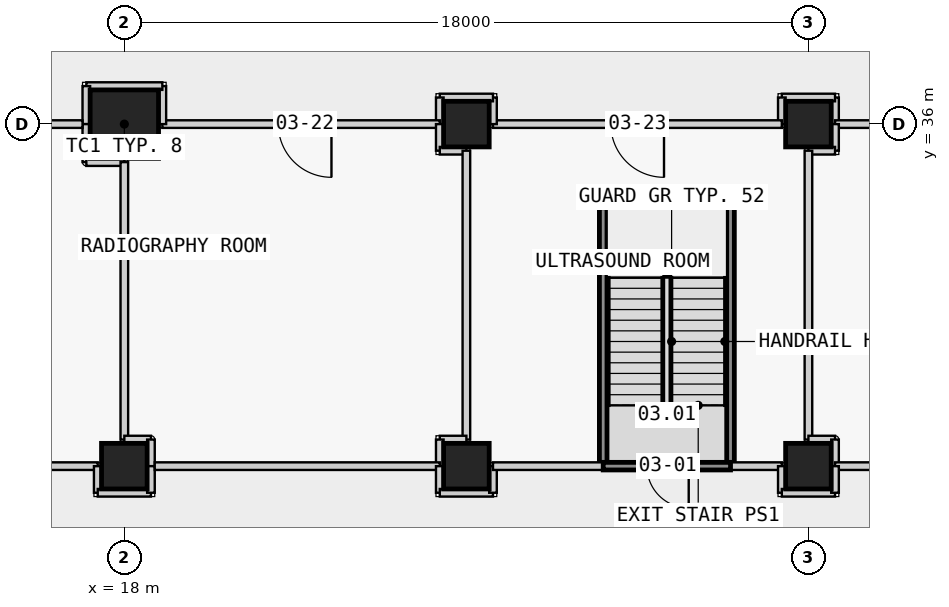
"""IFC4 building model, lengths in metres.
Left out: names, types, materials, properties, quantities, classifications, styles, units other than length and angle.
Written with IfcOpenShell. Run it as: python <this file> out.ifc"""

import sys

from ifc_helpers import new_model, si_unit, direction, frame, frame_2d, origin, origin_2d, place, context, subcontext, project, spatial, rectangle, extrude, element, fill, save


model = new_model("IFC4")
c1 = context("Model", 3, precision=1e-05, world=origin(), true_north=direction((0.0, 1.0)))
c2 = subcontext(c1, "Body", "Model", "MODEL_VIEW")
j1 = project(units=[si_unit("LENGTHUNIT", "METRE"), si_unit("PLANEANGLEUNIT", "RADIAN")], contexts=[c1])
p1 = place(None, origin())
s1 = spatial("IfcSite", under=j1, at=p1, CompositionType="ELEMENT")
p2 = place(p1, origin())
s2 = spatial("IfcBuilding", under=s1, at=p2, CompositionType="ELEMENT")
p3 = place(p2, frame((0.0, 0.0, 17.3)))
s3 = spatial("IfcBuildingStorey", under=s2, at=p3, CompositionType="ELEMENT", Elevation=17.3)
p4 = place(p3, frame((18.0, 27.0, 0.0), z_axis=(0.0, 0.0, 1.0), x_axis=(1.0, 0.0, 0.0)))
e1 = element("IfcColumn", 1, at=p4, inside=s3, PredefinedType="COLUMN", context=c2, shape_type="SweptSolid", body=[
    extrude(rectangle(XDim=1.2, YDim=1.2, at=origin_2d()), origin(), (0.0, 0.0, 1.0), 4.5),
])
p5 = place(p3, frame((18.0, 36.0, 0.0), z_axis=(0.0, 0.0, 1.0), x_axis=(1.0, 0.0, 0.0)))
e2 = element("IfcColumn", 2, at=p5, inside=s3, PredefinedType="COLUMN", context=c2, shape_type="SweptSolid", body=[
    extrude(rectangle(XDim=1.8, YDim=1.8, at=origin_2d()), origin(), (0.0, 0.0, 1.0), 4.5),
])
for number, where, z_axis, x_axis in (
    (3, (27.0, 27.0, 0.0), (0.0, 0.0, 1.0), (1.0, 0.0, 0.0)),
    (4, (27.0, 36.0, 0.0), (0.0, 0.0, 1.0), (1.0, 0.0, 0.0)),
    (5, (36.0, 27.0, 0.0), (0.0, 0.0, 1.0), (1.0, 0.0, 0.0)),
    (6, (36.0, 36.0, 0.0), (0.0, 0.0, 1.0), (1.0, 0.0, 0.0)),
):
    element("IfcColumn", number, at=place(p3, frame(where, z_axis=z_axis, x_axis=x_axis)), inside=s3, PredefinedType="COLUMN", context=c2, shape_type="SweptSolid", body=[
        extrude(rectangle(XDim=1.2, YDim=1.2, at=origin_2d()), origin(), (0.0, 0.0, 1.0), 4.5),
    ])
p6 = place(p3, frame((30.6, 27.0, 0.0), z_axis=(0.0, 0.0, 1.0), x_axis=(0.0, 1.0, 0.0)))
e7 = element("IfcWall", 7, at=p6, inside=s3, PredefinedType="PARTITIONING", context=c2, shape_type="SweptSolid", body=[
    extrude(rectangle(XDim=6.9, YDim=0.2, at=frame_2d((3.45, 0.0))), origin(), (0.0, 0.0, 1.0), 4.15),
])
p7 = place(p3, frame((30.6, 33.9, 0.0), z_axis=(0.0, 0.0, 1.0), x_axis=(1.0, 0.0, 0.0)))
e8 = element("IfcWall", 8, at=p7, inside=s3, PredefinedType="PARTITIONING", context=c2, shape_type="SweptSolid", body=[
    extrude(rectangle(XDim=3.35, YDim=0.2, at=frame_2d((1.675, 0.0))), origin(), (0.0, 0.0, 1.0), 4.15),
])
p8 = place(p3, frame((33.95, 33.9, 0.0), z_axis=(0.0, 0.0, 1.0), x_axis=(0.0, -1.0, 0.0)))
e9 = element("IfcWall", 9, at=p8, inside=s3, PredefinedType="PARTITIONING", context=c2, shape_type="SweptSolid", body=[
    extrude(rectangle(XDim=6.9, YDim=0.2, at=frame_2d((3.45, 0.0))), origin(), (0.0, 0.0, 1.0), 4.15),
])
p9 = place(p3, frame((36.7, 36.0, 0.0), z_axis=(0.0, 0.0, 1.0), x_axis=(0.0, 1.0, 0.0)))
e10 = element("IfcWall", 10, at=p9, inside=s3, PredefinedType="PARTITIONING", context=c2, shape_type="SweptSolid", body=[
    extrude(rectangle(XDim=0.7, YDim=0.2, at=frame_2d((0.35, 0.0))), origin(), (0.0, 0.0, 1.0), 4.15),
])
p10 = place(p3, frame((36.7, 36.7, 0.0), z_axis=(0.0, 0.0, 1.0), x_axis=(-1.0, 0.0, 0.0)))
e11 = element("IfcWall", 11, at=p10, inside=s3, PredefinedType="PARTITIONING", context=c2, shape_type="SweptSolid", body=[
    extrude(rectangle(XDim=1.4, YDim=0.2, at=frame_2d((0.7, 0.0))), origin(), (0.0, 0.0, 1.0), 4.15),
])
p11 = place(p3, frame((35.3, 36.7, 0.0), z_axis=(0.0, 0.0, 1.0), x_axis=(0.0, -1.0, 0.0)))
e12 = element("IfcWall", 12, at=p11, inside=s3, PredefinedType="PARTITIONING", context=c2, shape_type="SweptSolid", body=[
    extrude(rectangle(XDim=0.7, YDim=0.2, at=frame_2d((0.35, 0.0))), origin(), (0.0, 0.0, 1.0), 4.15),
])
p12 = place(p3, frame((35.3, 36.0, 0.0), z_axis=(0.0, 0.0, 1.0), x_axis=(-1.0, 0.0, 0.0)))
e13 = element("IfcWall", 13, at=p12, inside=s3, PredefinedType="PARTITIONING", context=c2, shape_type="SweptSolid", body=[
    extrude(rectangle(XDim=7.6, YDim=0.2, at=frame_2d((3.8, 0.0))), origin(), (0.0, 0.0, 1.0), 4.15),
])
p13 = place(p12, frame((3.1, 0.0, 0.0)))
e14 = element("IfcOpeningElement", 14, at=p13, cuts=e13, PredefinedType="OPENING", context=c2, shape_type="SweptSolid", body=[
    extrude(rectangle(XDim=1.4, YDim=2.1, at=frame_2d((0.7, 1.05))), frame((0.0, 0.11, 0.0), z_axis=(0.0, -1.0, 0.0), x_axis=(1.0, 0.0, 0.0)), (0.0, 0.0, 1.0), 0.22),
])
p14 = place(p3, frame((27.7, 36.0, 0.0), z_axis=(0.0, 0.0, 1.0), x_axis=(0.0, 1.0, 0.0)))
e15 = element("IfcWall", 15, at=p14, inside=s3, PredefinedType="PARTITIONING", context=c2, shape_type="SweptSolid", body=[
    extrude(rectangle(XDim=0.7, YDim=0.2, at=frame_2d((0.35, 0.0))), origin(), (0.0, 0.0, 1.0), 4.15),
])
p15 = place(p3, frame((27.7, 36.7, 0.0), z_axis=(0.0, 0.0, 1.0), x_axis=(-1.0, 0.0, 0.0)))
e16 = element("IfcWall", 16, at=p15, inside=s3, PredefinedType="PARTITIONING", context=c2, shape_type="SweptSolid", body=[
    extrude(rectangle(XDim=1.4, YDim=0.2, at=frame_2d((0.7, 0.0))), origin(), (0.0, 0.0, 1.0), 4.15),
])
p16 = place(p3, frame((26.3, 36.7, 0.0), z_axis=(0.0, 0.0, 1.0), x_axis=(0.0, -1.0, 0.0)))
e17 = element("IfcWall", 17, at=p16, inside=s3, PredefinedType="PARTITIONING", context=c2, shape_type="SweptSolid", body=[
    extrude(rectangle(XDim=0.7, YDim=0.2, at=frame_2d((0.35, 0.0))), origin(), (0.0, 0.0, 1.0), 4.15),
])
p17 = place(p3, frame((26.3, 36.0, 0.0), z_axis=(0.0, 0.0, 1.0), x_axis=(-1.0, 0.0, 0.0)))
e18 = element("IfcWall", 18, at=p17, inside=s3, PredefinedType="PARTITIONING", context=c2, shape_type="SweptSolid", body=[
    extrude(rectangle(XDim=7.3, YDim=0.2, at=frame_2d((3.65, 0.0))), origin(), (0.0, 0.0, 1.0), 4.15),
])
p18 = place(p17, frame((2.85, 0.0, 0.0)))
e19 = element("IfcOpeningElement", 19, at=p18, cuts=e18, PredefinedType="OPENING", context=c2, shape_type="SweptSolid", body=[
    extrude(rectangle(XDim=1.4, YDim=2.1, at=frame_2d((0.7, 1.05))), frame((0.0, 0.11, 0.0), z_axis=(0.0, -1.0, 0.0), x_axis=(1.0, 0.0, 0.0)), (0.0, 0.0, 1.0), 0.22),
])
p19 = place(p3, frame((19.0, 36.0, 0.0), z_axis=(0.0, 0.0, 1.0), x_axis=(0.0, 1.0, 0.0)))
e20 = element("IfcWall", 20, at=p19, inside=s3, PredefinedType="PARTITIONING", context=c2, shape_type="SweptSolid", body=[
    extrude(rectangle(XDim=1.0, YDim=0.2, at=frame_2d((0.5, 0.0))), origin(), (0.0, 0.0, 1.0), 4.15),
])
p20 = place(p3, frame((19.0, 37.0, 0.0), z_axis=(0.0, 0.0, 1.0), x_axis=(-1.0, 0.0, 0.0)))
e21 = element("IfcWall", 21, at=p20, inside=s3, PredefinedType="PARTITIONING", context=c2, shape_type="SweptSolid", body=[
    extrude(rectangle(XDim=2.0, YDim=0.2, at=frame_2d((1.0, 0.0))), origin(), (0.0, 0.0, 1.0), 4.15),
])
for number, where, z_axis, x_axis in (
    (22, (17.0, 37.0, 0.0), (0.0, 0.0, 1.0), (0.0, -1.0, 0.0)),
    (23, (17.0, 36.0, 0.0), (0.0, 0.0, 1.0), (0.0, -1.0, 0.0)),
    (24, (17.0, 35.0, 0.0), (0.0, 0.0, 1.0), (1.0, 0.0, 0.0)),
):
    element("IfcWall", number, at=place(p3, frame(where, z_axis=z_axis, x_axis=x_axis)), inside=s3, PredefinedType="PARTITIONING", context=c2, shape_type="SweptSolid", body=[
        extrude(rectangle(XDim=1.0, YDim=0.2, at=frame_2d((0.5, 0.0))), origin(), (0.0, 0.0, 1.0), 4.15),
    ])
p21 = place(p3, frame((18.0, 35.0, 0.0), z_axis=(0.0, 0.0, 1.0), x_axis=(0.0, -1.0, 0.0)))
e25 = element("IfcWall", 25, at=p21, inside=s3, PredefinedType="PARTITIONING", context=c2, shape_type="SweptSolid", body=[
    extrude(rectangle(XDim=7.3, YDim=0.2, at=frame_2d((3.65, 0.0))), origin(), (0.0, 0.0, 1.0), 4.15),
])
for number, where, z_axis, x_axis in (
    (26, (18.0, 27.7, 0.0), (0.0, 0.0, 1.0), (1.0, 0.0, 0.0)),
    (27, (18.7, 27.7, 0.0), (0.0, 0.0, 1.0), (0.0, -1.0, 0.0)),
):
    element("IfcWall", number, at=place(p3, frame(where, z_axis=z_axis, x_axis=x_axis)), inside=s3, PredefinedType="PARTITIONING", context=c2, shape_type="SweptSolid", body=[
        extrude(rectangle(XDim=0.7, YDim=0.2, at=frame_2d((0.35, 0.0))), origin(), (0.0, 0.0, 1.0), 4.15),
    ])
p22 = place(p3, frame((44.3, 36.0, 0.0), z_axis=(0.0, 0.0, 1.0), x_axis=(-1.0, 0.0, 0.0)))
e28 = element("IfcWall", 28, at=p22, inside=s3, PredefinedType="PARTITIONING", context=c2, shape_type="SweptSolid", body=[
    extrude(rectangle(XDim=7.6, YDim=0.2, at=frame_2d((3.8, 0.0))), origin(), (0.0, 0.0, 1.0), 4.15),
])
p23 = place(p22, frame((3.1, 0.0, 0.0)))
e29 = element("IfcOpeningElement", 29, at=p23, cuts=e28, PredefinedType="OPENING", context=c2, shape_type="SweptSolid", body=[
    extrude(rectangle(XDim=1.4, YDim=2.1, at=frame_2d((0.7, 1.05))), frame((0.0, 0.11, 0.0), z_axis=(0.0, -1.0, 0.0), x_axis=(1.0, 0.0, 0.0)), (0.0, 0.0, 1.0), 0.22),
])
for number, where, z_axis, x_axis in (
    (30, (26.3, 36.0, 0.0), (0.0, 0.0, 1.0), (0.0, -1.0, 0.0)),
    (31, (26.3, 35.3, 0.0), (0.0, 0.0, 1.0), (1.0, 0.0, 0.0)),
):
    element("IfcWall", number, at=place(p3, frame(where, z_axis=z_axis, x_axis=x_axis)), inside=s3, PredefinedType="PARTITIONING", context=c2, shape_type="SweptSolid", body=[
        extrude(rectangle(XDim=0.7, YDim=0.2, at=frame_2d((0.35, 0.0))), origin(), (0.0, 0.0, 1.0), 4.15),
    ])
p24 = place(p3, frame((27.0, 35.3, 0.0), z_axis=(0.0, 0.0, 1.0), x_axis=(0.0, -1.0, 0.0)))
e32 = element("IfcWall", 32, at=p24, inside=s3, PredefinedType="PARTITIONING", context=c2, shape_type="SweptSolid", body=[
    extrude(rectangle(XDim=7.6, YDim=0.2, at=frame_2d((3.8, 0.0))), origin(), (0.0, 0.0, 1.0), 4.15),
])
for number, where, z_axis, x_axis in (
    (33, (27.0, 27.7, 0.0), (0.0, 0.0, 1.0), (-1.0, 0.0, 0.0)),
    (34, (26.3, 27.7, 0.0), (0.0, 0.0, 1.0), (0.0, -1.0, 0.0)),
):
    element("IfcWall", number, at=place(p3, frame(where, z_axis=z_axis, x_axis=x_axis)), inside=s3, PredefinedType="PARTITIONING", context=c2, shape_type="SweptSolid", body=[
        extrude(rectangle(XDim=0.7, YDim=0.2, at=frame_2d((0.35, 0.0))), origin(), (0.0, 0.0, 1.0), 4.15),
    ])
p25 = place(p3, frame((9.7, 27.0, 0.0), z_axis=(0.0, 0.0, 1.0), x_axis=(1.0, 0.0, 0.0)))
e35 = element("IfcWall", 35, at=p25, inside=s3, PredefinedType="PARTITIONING", context=c2, shape_type="SweptSolid", body=[
    extrude(rectangle(XDim=7.6, YDim=0.2, at=frame_2d((3.8, 0.0))), origin(), (0.0, 0.0, 1.0), 4.15),
])
p26 = place(p25, frame((3.1, 0.0, 0.0)))
e36 = element("IfcOpeningElement", 36, at=p26, cuts=e35, PredefinedType="OPENING", context=c2, shape_type="SweptSolid", body=[
    extrude(rectangle(XDim=1.4, YDim=2.1, at=frame_2d((0.7, 1.05))), frame((0.0, 0.11, 0.0), z_axis=(0.0, -1.0, 0.0), x_axis=(1.0, 0.0, 0.0)), (0.0, 0.0, 1.0), 0.22),
])
p27 = place(p3, frame((17.3, 27.0, 0.0), z_axis=(0.0, 0.0, 1.0), x_axis=(0.0, -1.0, 0.0)))
e37 = element("IfcWall", 37, at=p27, inside=s3, PredefinedType="PARTITIONING", context=c2, shape_type="SweptSolid", body=[
    extrude(rectangle(XDim=0.7, YDim=0.2, at=frame_2d((0.35, 0.0))), origin(), (0.0, 0.0, 1.0), 4.15),
])
p28 = place(p3, frame((17.3, 26.3, 0.0), z_axis=(0.0, 0.0, 1.0), x_axis=(1.0, 0.0, 0.0)))
e38 = element("IfcWall", 38, at=p28, inside=s3, PredefinedType="PARTITIONING", context=c2, shape_type="SweptSolid", body=[
    extrude(rectangle(XDim=1.4, YDim=0.2, at=frame_2d((0.7, 0.0))), origin(), (0.0, 0.0, 1.0), 4.15),
])
for number, where, z_axis, x_axis in (
    (39, (18.7, 26.3, 0.0), (0.0, 0.0, 1.0), (0.0, 1.0, 0.0)),
    (40, (36.7, 36.0, 0.0), (0.0, 0.0, 1.0), (0.0, -1.0, 0.0)),
    (41, (36.7, 35.3, 0.0), (0.0, 0.0, 1.0), (-1.0, 0.0, 0.0)),
):
    element("IfcWall", number, at=place(p3, frame(where, z_axis=z_axis, x_axis=x_axis)), inside=s3, PredefinedType="PARTITIONING", context=c2, shape_type="SweptSolid", body=[
        extrude(rectangle(XDim=0.7, YDim=0.2, at=frame_2d((0.35, 0.0))), origin(), (0.0, 0.0, 1.0), 4.15),
    ])
p29 = place(p3, frame((36.0, 35.3, 0.0), z_axis=(0.0, 0.0, 1.0), x_axis=(0.0, -1.0, 0.0)))
e42 = element("IfcWall", 42, at=p29, inside=s3, PredefinedType="PARTITIONING", context=c2, shape_type="SweptSolid", body=[
    extrude(rectangle(XDim=7.6, YDim=0.2, at=frame_2d((3.8, 0.0))), origin(), (0.0, 0.0, 1.0), 4.15),
])
for number, where, z_axis, x_axis in (
    (43, (36.0, 27.7, 0.0), (0.0, 0.0, 1.0), (1.0, 0.0, 0.0)),
    (44, (36.7, 27.7, 0.0), (0.0, 0.0, 1.0), (0.0, -1.0, 0.0)),
):
    element("IfcWall", number, at=place(p3, frame(where, z_axis=z_axis, x_axis=x_axis)), inside=s3, PredefinedType="PARTITIONING", context=c2, shape_type="SweptSolid", body=[
        extrude(rectangle(XDim=0.7, YDim=0.2, at=frame_2d((0.35, 0.0))), origin(), (0.0, 0.0, 1.0), 4.15),
    ])
p30 = place(p3, frame((16.9, 36.0, 0.0), z_axis=(0.0, 0.0, 1.0), x_axis=(-1.0, 0.0, 0.0)))
e45 = element("IfcWall", 45, at=p30, inside=s3, PredefinedType="PARTITIONING", context=c2, shape_type="SweptSolid", body=[
    extrude(rectangle(XDim=7.2, YDim=0.2, at=frame_2d((3.6, 0.0))), origin(), (0.0, 0.0, 1.0), 4.15),
])
p31 = place(p3, frame((18.8, 27.0, 0.0), z_axis=(0.0, 0.0, 1.0), x_axis=(1.0, 0.0, 0.0)))
e46 = element("IfcWall", 46, at=p31, inside=s3, PredefinedType="PARTITIONING", context=c2, shape_type="SweptSolid", body=[
    extrude(rectangle(XDim=7.5, YDim=0.2, at=frame_2d((3.75, 0.0))), origin(), (0.0, 0.0, 1.0), 4.15),
])
p32 = place(p3, frame((36.7, 27.0, 0.0), z_axis=(0.0, 0.0, 1.0), x_axis=(1.0, 0.0, 0.0)))
e47 = element("IfcWall", 47, at=p32, inside=s3, PredefinedType="PARTITIONING", context=c2, shape_type="SweptSolid", body=[
    extrude(rectangle(XDim=7.6, YDim=0.2, at=frame_2d((3.8, 0.0))), origin(), (0.0, 0.0, 1.0), 4.15),
])
p33 = place(p3, frame((26.3, 27.0, 0.0), z_axis=(0.0, 0.0, 1.0), x_axis=(0.0, -1.0, 0.0)))
e48 = element("IfcWall", 48, at=p33, inside=s3, PredefinedType="PARTITIONING", context=c2, shape_type="SweptSolid", body=[
    extrude(rectangle(XDim=0.7, YDim=0.2, at=frame_2d((0.35, 0.0))), origin(), (0.0, 0.0, 1.0), 4.15),
])
p34 = place(p3, frame((26.3, 26.3, 0.0), z_axis=(0.0, 0.0, 1.0), x_axis=(1.0, 0.0, 0.0)))
e49 = element("IfcWall", 49, at=p34, inside=s3, PredefinedType="PARTITIONING", context=c2, shape_type="SweptSolid", body=[
    extrude(rectangle(XDim=1.4, YDim=0.2, at=frame_2d((0.7, 0.0))), origin(), (0.0, 0.0, 1.0), 4.15),
])
p35 = place(p3, frame((27.7, 26.3, 0.0), z_axis=(0.0, 0.0, 1.0), x_axis=(0.0, 1.0, 0.0)))
e50 = element("IfcWall", 50, at=p35, inside=s3, PredefinedType="PARTITIONING", context=c2, shape_type="SweptSolid", body=[
    extrude(rectangle(XDim=0.7, YDim=0.2, at=frame_2d((0.35, 0.0))), origin(), (0.0, 0.0, 1.0), 4.15),
])
p36 = place(p3, frame((27.7, 27.0, 0.0), z_axis=(0.0, 0.0, 1.0), x_axis=(1.0, 0.0, 0.0)))
e51 = element("IfcWall", 51, at=p36, inside=s3, PredefinedType="PARTITIONING", context=c2, shape_type="SweptSolid", body=[
    extrude(rectangle(XDim=2.9, YDim=0.2, at=frame_2d((1.45, 0.0))), origin(), (0.0, 0.0, 1.0), 4.15),
])
p37 = place(p3, frame((33.95, 27.0, 0.0), z_axis=(0.0, 0.0, 1.0), x_axis=(1.0, 0.0, 0.0)))
e52 = element("IfcWall", 52, at=p37, inside=s3, PredefinedType="PARTITIONING", context=c2, shape_type="SweptSolid", body=[
    extrude(rectangle(XDim=1.35, YDim=0.2, at=frame_2d((0.675, 0.0))), origin(), (0.0, 0.0, 1.0), 4.15),
])
p38 = place(p3, frame((35.3, 27.0, 0.0), z_axis=(0.0, 0.0, 1.0), x_axis=(0.0, -1.0, 0.0)))
e53 = element("IfcWall", 53, at=p38, inside=s3, PredefinedType="PARTITIONING", context=c2, shape_type="SweptSolid", body=[
    extrude(rectangle(XDim=0.7, YDim=0.2, at=frame_2d((0.35, 0.0))), origin(), (0.0, 0.0, 1.0), 4.15),
])
p39 = place(p3, frame((35.3, 26.3, 0.0), z_axis=(0.0, 0.0, 1.0), x_axis=(1.0, 0.0, 0.0)))
e54 = element("IfcWall", 54, at=p39, inside=s3, PredefinedType="PARTITIONING", context=c2, shape_type="SweptSolid", body=[
    extrude(rectangle(XDim=1.4, YDim=0.2, at=frame_2d((0.7, 0.0))), origin(), (0.0, 0.0, 1.0), 4.15),
])
p40 = place(p3, frame((36.7, 26.3, 0.0), z_axis=(0.0, 0.0, 1.0), x_axis=(0.0, 1.0, 0.0)))
e55 = element("IfcWall", 55, at=p40, inside=s3, PredefinedType="PARTITIONING", context=c2, shape_type="SweptSolid", body=[
    extrude(rectangle(XDim=0.7, YDim=0.2, at=frame_2d((0.35, 0.0))), origin(), (0.0, 0.0, 1.0), 4.15),
])
p41 = place(p3, frame((33.95, 27.0, 0.0), z_axis=(0.0, 0.0, 1.0), x_axis=(-1.0, 0.0, 0.0)))
e56 = element("IfcWall", 56, at=p41, inside=s3, PredefinedType="PARTITIONING", context=c2, shape_type="SweptSolid", body=[
    extrude(rectangle(XDim=3.35, YDim=0.2, at=frame_2d((1.675, 0.0))), origin(), (0.0, 0.0, 1.0), 4.15),
])
p42 = place(p41, frame((1.1, 0.0, 0.0)))
e57 = element("IfcOpeningElement", 57, at=p42, cuts=e56, PredefinedType="OPENING", context=c2, shape_type="SweptSolid", body=[
    extrude(rectangle(XDim=1.1, YDim=2.1, at=frame_2d((0.55, 1.05))), frame((0.0, 0.11, 0.0), z_axis=(0.0, -1.0, 0.0), x_axis=(1.0, 0.0, 0.0)), (0.0, 0.0, 1.0), 0.22),
])
p43 = place(p42, origin())
e58 = element("IfcDoor", 58, at=p43, inside=s3, OperationType="SINGLE_SWING_LEFT", PredefinedType="DOOR", context=c2, shape_type="SweptSolid", body=[
    extrude(rectangle(XDim=1.1, YDim=2.1, at=frame_2d((0.55, 1.05))), frame((0.0, 0.025, 0.0), z_axis=(0.0, -1.0, 0.0), x_axis=(1.0, 0.0, 0.0)), (0.0, 0.0, 1.0), 0.05),
])
fill(e57, e58)
p44 = place(p18, origin())
e59 = element("IfcDoor", 59, at=p44, inside=s3, OperationType="SINGLE_SWING_LEFT", PredefinedType="DOOR", context=c2, shape_type="SweptSolid", body=[
    extrude(rectangle(XDim=1.4, YDim=2.1, at=frame_2d((0.7, 1.05))), frame((0.0, 0.025, 0.0), z_axis=(0.0, -1.0, 0.0), x_axis=(1.0, 0.0, 0.0)), (0.0, 0.0, 1.0), 0.05),
])
fill(e19, e59)
p45 = place(p13, origin())
e60 = element("IfcDoor", 60, at=p45, inside=s3, OperationType="SINGLE_SWING_LEFT", PredefinedType="DOOR", context=c2, shape_type="SweptSolid", body=[
    extrude(rectangle(XDim=1.4, YDim=2.1, at=frame_2d((0.7, 1.05))), frame((0.0, 0.025, 0.0), z_axis=(0.0, -1.0, 0.0), x_axis=(1.0, 0.0, 0.0)), (0.0, 0.0, 1.0), 0.05),
])
fill(e14, e60)
save(model, sys.argv[1])
